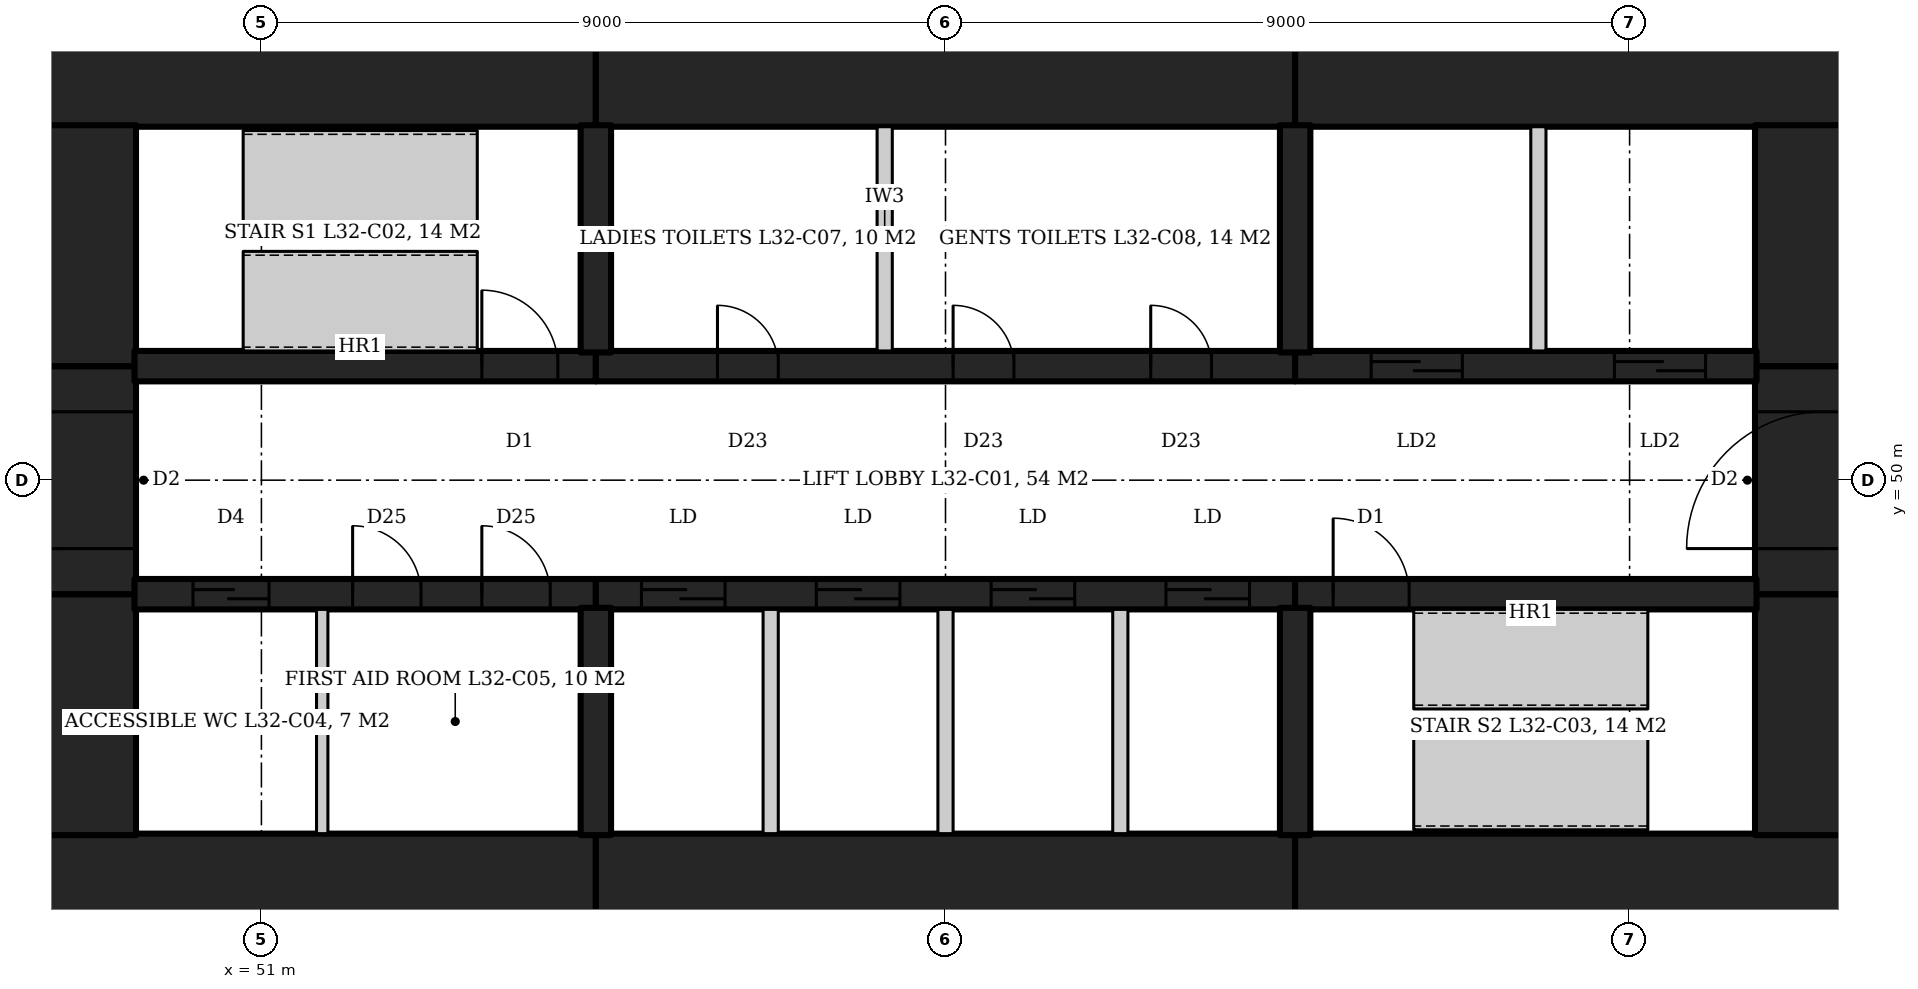
"""IFC4 building model, lengths in metres.
Left out: names, types, materials, properties, quantities, classifications, styles, units other than length and angle.
Written with IfcOpenShell. Run it as: python <this file> out.ifc"""

import sys

from ifc_helpers import new_model, si_unit, direction, frame, frame_2d, origin, place, context, subcontext, project, spatial, rectangle, extrude, element, fill, save


model = new_model("IFC4")
c1 = context("Model", 3, precision=1e-05, world=origin(), true_north=direction((0.0, 1.0)))
c2 = subcontext(c1, "Body", "Model", "MODEL_VIEW")
j1 = project(units=[si_unit("LENGTHUNIT", "METRE"), si_unit("PLANEANGLEUNIT", "RADIAN")], contexts=[c1])
p1 = place(None, origin())
s1 = spatial("IfcSite", under=j1, at=p1, CompositionType="ELEMENT")
p2 = place(p1, origin())
s2 = spatial("IfcBuilding", under=s1, at=p2, CompositionType="ELEMENT")
p3 = place(p2, frame((0.0, 0.0, 135.2)))
s3 = spatial("IfcBuildingStorey", under=s2, at=p3, CompositionType="ELEMENT", Elevation=135.2)
p4 = place(p3, frame((47.55, 55.55, 0.0), z_axis=(0.0, 0.0, 1.0), x_axis=(1.0, 0.0, 0.0)))
e1 = element("IfcWall", 1, at=p4, inside=s3, PredefinedType="SHEAR", context=c2, shape_type="SweptSolid", body=[
    extrude(rectangle(XDim=7.85, YDim=1.8, at=frame_2d((3.925, 0.0))), origin(), (0.0, 0.0, 1.0), 4.2),
])
p5 = place(p3, frame((55.4, 55.55, 0.0), z_axis=(0.0, 0.0, 1.0), x_axis=(1.0, 0.0, 0.0)))
e2 = element("IfcWall", 2, at=p5, inside=s3, PredefinedType="SHEAR", context=c2, shape_type="SweptSolid", body=[
    extrude(rectangle(XDim=9.2, YDim=1.8, at=frame_2d((4.6, 0.0))), origin(), (0.0, 0.0, 1.0), 4.2),
])
for number, where, z_axis, x_axis in (
    (3, (64.6, 55.55, 0.0), (0.0, 0.0, 1.0), (1.0, 0.0, 0.0)),
    (4, (47.55, 44.45, 0.0), (0.0, 0.0, 1.0), (1.0, 0.0, 0.0)),
):
    element("IfcWall", number, at=place(p3, frame(where, z_axis=z_axis, x_axis=x_axis)), inside=s3, PredefinedType="SHEAR", context=c2, shape_type="SweptSolid", body=[
        extrude(rectangle(XDim=7.85, YDim=1.8, at=frame_2d((3.925, 0.0))), origin(), (0.0, 0.0, 1.0), 4.2),
    ])
p6 = place(p3, frame((55.4, 44.45, 0.0), z_axis=(0.0, 0.0, 1.0), x_axis=(1.0, 0.0, 0.0)))
e5 = element("IfcWall", 5, at=p6, inside=s3, PredefinedType="SHEAR", context=c2, shape_type="SweptSolid", body=[
    extrude(rectangle(XDim=9.2, YDim=1.8, at=frame_2d((4.6, 0.0))), origin(), (0.0, 0.0, 1.0), 4.2),
])
p7 = place(p3, frame((64.6, 44.45, 0.0), z_axis=(0.0, 0.0, 1.0), x_axis=(1.0, 0.0, 0.0)))
e6 = element("IfcWall", 6, at=p7, inside=s3, PredefinedType="SHEAR", context=c2, shape_type="SweptSolid", body=[
    extrude(rectangle(XDim=7.85, YDim=1.8, at=frame_2d((3.925, 0.0))), origin(), (0.0, 0.0, 1.0), 4.2),
])
p8 = place(p3, frame((71.55, 45.33, 0.0), z_axis=(0.0, 0.0, 1.0), x_axis=(0.0, 1.0, 0.0)))
e7 = element("IfcWall", 7, at=p8, inside=s3, PredefinedType="SHEAR", context=c2, shape_type="SweptSolid", body=[
    extrude(rectangle(XDim=3.17, YDim=1.8, at=frame_2d((1.585, 0.0))), origin(), (0.0, 0.0, 1.0), 4.2),
])
p9 = place(p3, frame((71.55, 48.5, 0.0), z_axis=(0.0, 0.0, 1.0), x_axis=(0.0, 1.0, 0.0)))
e8 = element("IfcWall", 8, at=p9, inside=s3, PredefinedType="SHEAR", context=c2, shape_type="SweptSolid", body=[
    extrude(rectangle(XDim=3.0, YDim=1.8, at=frame_2d((1.5, 0.0))), origin(), (0.0, 0.0, 1.0), 4.2),
])
p10 = place(p9, frame((0.6, 0.0, 0.0)))
e9 = element("IfcOpeningElement", 9, at=p10, cuts=e8, PredefinedType="OPENING", context=c2, shape_type="SweptSolid", body=[
    extrude(rectangle(XDim=1.8, YDim=2.1, at=frame_2d((0.9, 1.05))), frame((0.0, 0.91, 0.0), z_axis=(0.0, -1.0, 0.0), x_axis=(1.0, 0.0, 0.0)), (0.0, 0.0, 1.0), 1.82),
])
for number, where, z_axis, x_axis in (
    (10, (71.55, 51.5, 0.0), (0.0, 0.0, 1.0), (0.0, 1.0, 0.0)),
    (11, (48.45, 45.33, 0.0), (0.0, 0.0, 1.0), (0.0, 1.0, 0.0)),
):
    element("IfcWall", number, at=place(p3, frame(where, z_axis=z_axis, x_axis=x_axis)), inside=s3, PredefinedType="SHEAR", context=c2, shape_type="SweptSolid", body=[
        extrude(rectangle(XDim=3.17, YDim=1.8, at=frame_2d((1.585, 0.0))), origin(), (0.0, 0.0, 1.0), 4.2),
    ])
p11 = place(p3, frame((48.45, 48.5, 0.0), z_axis=(0.0, 0.0, 1.0), x_axis=(0.0, 1.0, 0.0)))
e12 = element("IfcWall", 12, at=p11, inside=s3, PredefinedType="SHEAR", context=c2, shape_type="SweptSolid", body=[
    extrude(rectangle(XDim=3.0, YDim=1.8, at=frame_2d((1.5, 0.0))), origin(), (0.0, 0.0, 1.0), 4.2),
])
p12 = place(p11, frame((0.6, 0.0, 0.0)))
e13 = element("IfcOpeningElement", 13, at=p12, cuts=e12, PredefinedType="OPENING", context=c2, shape_type="SweptSolid", body=[
    extrude(rectangle(XDim=1.8, YDim=2.1, at=frame_2d((0.9, 1.05))), frame((0.0, 0.91, 0.0), z_axis=(0.0, -1.0, 0.0), x_axis=(1.0, 0.0, 0.0)), (0.0, 0.0, 1.0), 1.82),
])
p13 = place(p3, frame((48.45, 51.5, 0.0), z_axis=(0.0, 0.0, 1.0), x_axis=(0.0, 1.0, 0.0)))
e14 = element("IfcWall", 14, at=p13, inside=s3, PredefinedType="SHEAR", context=c2, shape_type="SweptSolid", body=[
    extrude(rectangle(XDim=3.17, YDim=1.8, at=frame_2d((1.585, 0.0))), origin(), (0.0, 0.0, 1.0), 4.2),
])
p14 = place(p3, frame((49.33, 51.5, 0.0), z_axis=(0.0, 0.0, 1.0), x_axis=(1.0, 0.0, 0.0)))
e15 = element("IfcWall", 15, at=p14, inside=s3, PredefinedType="SHEAR", context=c2, shape_type="SweptSolid", body=[
    extrude(rectangle(XDim=6.07, YDim=0.4, at=frame_2d((3.035, 0.0))), origin(), (0.0, 0.0, 1.0), 4.2),
])
p15 = place(p14, frame((4.57, 0.0, 0.0)))
e16 = element("IfcOpeningElement", 16, at=p15, cuts=e15, PredefinedType="OPENING", context=c2, shape_type="SweptSolid", body=[
    extrude(rectangle(XDim=1.0, YDim=2.1, at=frame_2d((0.5, 1.05))), frame((0.0, 0.21, 0.0), z_axis=(0.0, -1.0, 0.0), x_axis=(1.0, 0.0, 0.0)), (0.0, 0.0, 1.0), 0.42),
])
p16 = place(p3, frame((55.4, 51.5, 0.0), z_axis=(0.0, 0.0, 1.0), x_axis=(1.0, 0.0, 0.0)))
e17 = element("IfcWall", 17, at=p16, inside=s3, PredefinedType="SHEAR", context=c2, shape_type="SweptSolid", body=[
    extrude(rectangle(XDim=9.2, YDim=0.4, at=frame_2d((4.6, 0.0))), origin(), (0.0, 0.0, 1.0), 4.2),
])
p17 = place(p16, frame((1.6, 0.0, 0.0)))
e18 = element("IfcOpeningElement", 18, at=p17, cuts=e17, PredefinedType="OPENING", context=c2, shape_type="SweptSolid", body=[
    extrude(rectangle(XDim=0.8, YDim=2.1, at=frame_2d((0.4, 1.05))), frame((0.0, 0.21, 0.0), z_axis=(0.0, -1.0, 0.0), x_axis=(1.0, 0.0, 0.0)), (0.0, 0.0, 1.0), 0.42),
])
p18 = place(p16, frame((4.7, 0.0, 0.0)))
e19 = element("IfcOpeningElement", 19, at=p18, cuts=e17, PredefinedType="OPENING", context=c2, shape_type="SweptSolid", body=[
    extrude(rectangle(XDim=0.8, YDim=2.1, at=frame_2d((0.4, 1.05))), frame((0.0, 0.21, 0.0), z_axis=(0.0, -1.0, 0.0), x_axis=(1.0, 0.0, 0.0)), (0.0, 0.0, 1.0), 0.42),
])
p19 = place(p16, frame((7.3, 0.0, 0.0)))
e20 = element("IfcOpeningElement", 20, at=p19, cuts=e17, PredefinedType="OPENING", context=c2, shape_type="SweptSolid", body=[
    extrude(rectangle(XDim=0.8, YDim=2.1, at=frame_2d((0.4, 1.05))), frame((0.0, 0.21, 0.0), z_axis=(0.0, -1.0, 0.0), x_axis=(1.0, 0.0, 0.0)), (0.0, 0.0, 1.0), 0.42),
])
p20 = place(p3, frame((64.6, 51.5, 0.0), z_axis=(0.0, 0.0, 1.0), x_axis=(1.0, 0.0, 0.0)))
e21 = element("IfcWall", 21, at=p20, inside=s3, PredefinedType="SHEAR", context=c2, shape_type="SweptSolid", body=[
    extrude(rectangle(XDim=6.07, YDim=0.4, at=frame_2d((3.035, 0.0))), origin(), (0.0, 0.0, 1.0), 4.2),
])
p21 = place(p20, frame((1.0, 0.0, 0.0)))
e22 = element("IfcOpeningElement", 22, at=p21, cuts=e21, PredefinedType="OPENING", context=c2, shape_type="SweptSolid", body=[
    extrude(rectangle(XDim=1.2, YDim=2.1, at=frame_2d((0.6, 1.05))), frame((0.0, 0.21, 0.0), z_axis=(0.0, -1.0, 0.0), x_axis=(1.0, 0.0, 0.0)), (0.0, 0.0, 1.0), 0.42),
])
p22 = place(p20, frame((4.2, 0.0, 0.0)))
e23 = element("IfcOpeningElement", 23, at=p22, cuts=e21, PredefinedType="OPENING", context=c2, shape_type="SweptSolid", body=[
    extrude(rectangle(XDim=1.2, YDim=2.1, at=frame_2d((0.6, 1.05))), frame((0.0, 0.21, 0.0), z_axis=(0.0, -1.0, 0.0), x_axis=(1.0, 0.0, 0.0)), (0.0, 0.0, 1.0), 0.42),
])
p23 = place(p3, frame((49.33, 48.5, 0.0), z_axis=(0.0, 0.0, 1.0), x_axis=(1.0, 0.0, 0.0)))
e24 = element("IfcWall", 24, at=p23, inside=s3, PredefinedType="SHEAR", context=c2, shape_type="SweptSolid", body=[
    extrude(rectangle(XDim=6.07, YDim=0.4, at=frame_2d((3.035, 0.0))), origin(), (0.0, 0.0, 1.0), 4.2),
])
p24 = place(p23, frame((0.77, 0.0, 0.0)))
e25 = element("IfcOpeningElement", 25, at=p24, cuts=e24, PredefinedType="OPENING", context=c2, shape_type="SweptSolid", body=[
    extrude(rectangle(XDim=1.0, YDim=2.1, at=frame_2d((0.5, 1.05))), frame((0.0, 0.21, 0.0), z_axis=(0.0, -1.0, 0.0), x_axis=(1.0, 0.0, 0.0)), (0.0, 0.0, 1.0), 0.42),
])
p25 = place(p23, frame((2.87, 0.0, 0.0)))
e26 = element("IfcOpeningElement", 26, at=p25, cuts=e24, PredefinedType="OPENING", context=c2, shape_type="SweptSolid", body=[
    extrude(rectangle(XDim=0.9, YDim=2.1, at=frame_2d((0.45, 1.05))), frame((0.0, 0.21, 0.0), z_axis=(0.0, -1.0, 0.0), x_axis=(1.0, 0.0, 0.0)), (0.0, 0.0, 1.0), 0.42),
])
p26 = place(p23, frame((4.57, 0.0, 0.0)))
e27 = element("IfcOpeningElement", 27, at=p26, cuts=e24, PredefinedType="OPENING", context=c2, shape_type="SweptSolid", body=[
    extrude(rectangle(XDim=0.9, YDim=2.1, at=frame_2d((0.45, 1.05))), frame((0.0, 0.21, 0.0), z_axis=(0.0, -1.0, 0.0), x_axis=(1.0, 0.0, 0.0)), (0.0, 0.0, 1.0), 0.42),
])
p27 = place(p3, frame((55.4, 48.5, 0.0), z_axis=(0.0, 0.0, 1.0), x_axis=(1.0, 0.0, 0.0)))
e28 = element("IfcWall", 28, at=p27, inside=s3, PredefinedType="SHEAR", context=c2, shape_type="SweptSolid", body=[
    extrude(rectangle(XDim=9.2, YDim=0.4, at=frame_2d((4.6, 0.0))), origin(), (0.0, 0.0, 1.0), 4.2),
])
p28 = place(p27, frame((0.6, 0.0, 0.0)))
e29 = element("IfcOpeningElement", 29, at=p28, cuts=e28, PredefinedType="OPENING", context=c2, shape_type="SweptSolid", body=[
    extrude(rectangle(XDim=1.1, YDim=2.1, at=frame_2d((0.55, 1.05))), frame((0.0, 0.21, 0.0), z_axis=(0.0, -1.0, 0.0), x_axis=(1.0, 0.0, 0.0)), (0.0, 0.0, 1.0), 0.42),
])
p29 = place(p27, frame((2.9, 0.0, 0.0)))
e30 = element("IfcOpeningElement", 30, at=p29, cuts=e28, PredefinedType="OPENING", context=c2, shape_type="SweptSolid", body=[
    extrude(rectangle(XDim=1.1, YDim=2.1, at=frame_2d((0.55, 1.05))), frame((0.0, 0.21, 0.0), z_axis=(0.0, -1.0, 0.0), x_axis=(1.0, 0.0, 0.0)), (0.0, 0.0, 1.0), 0.42),
])
p30 = place(p27, frame((5.2, 0.0, 0.0)))
e31 = element("IfcOpeningElement", 31, at=p30, cuts=e28, PredefinedType="OPENING", context=c2, shape_type="SweptSolid", body=[
    extrude(rectangle(XDim=1.1, YDim=2.1, at=frame_2d((0.55, 1.05))), frame((0.0, 0.21, 0.0), z_axis=(0.0, -1.0, 0.0), x_axis=(1.0, 0.0, 0.0)), (0.0, 0.0, 1.0), 0.42),
])
p31 = place(p27, frame((7.5, 0.0, 0.0)))
e32 = element("IfcOpeningElement", 32, at=p31, cuts=e28, PredefinedType="OPENING", context=c2, shape_type="SweptSolid", body=[
    extrude(rectangle(XDim=1.1, YDim=2.1, at=frame_2d((0.55, 1.05))), frame((0.0, 0.21, 0.0), z_axis=(0.0, -1.0, 0.0), x_axis=(1.0, 0.0, 0.0)), (0.0, 0.0, 1.0), 0.42),
])
p32 = place(p3, frame((64.6, 48.5, 0.0), z_axis=(0.0, 0.0, 1.0), x_axis=(1.0, 0.0, 0.0)))
e33 = element("IfcWall", 33, at=p32, inside=s3, PredefinedType="SHEAR", context=c2, shape_type="SweptSolid", body=[
    extrude(rectangle(XDim=6.07, YDim=0.4, at=frame_2d((3.035, 0.0))), origin(), (0.0, 0.0, 1.0), 4.2),
])
p33 = place(p32, frame((0.5, 0.0, 0.0)))
e34 = element("IfcOpeningElement", 34, at=p33, cuts=e33, PredefinedType="OPENING", context=c2, shape_type="SweptSolid", body=[
    extrude(rectangle(XDim=1.0, YDim=2.1, at=frame_2d((0.5, 1.05))), frame((0.0, 0.21, 0.0), z_axis=(0.0, -1.0, 0.0), x_axis=(1.0, 0.0, 0.0)), (0.0, 0.0, 1.0), 0.42),
])
for number, where, z_axis, x_axis in (
    (35, (55.4, 51.68, 0.0), (0.0, 0.0, 1.0), (0.0, 1.0, 0.0)),
    (36, (64.6, 51.68, 0.0), (0.0, 0.0, 1.0), (0.0, 1.0, 0.0)),
    (37, (55.4, 48.32, 0.0), (0.0, 0.0, 1.0), (0.0, -1.0, 0.0)),
    (38, (64.6, 48.32, 0.0), (0.0, 0.0, 1.0), (0.0, -1.0, 0.0)),
):
    element("IfcWall", number, at=place(p3, frame(where, z_axis=z_axis, x_axis=x_axis)), inside=s3, PredefinedType="SHEAR", context=c2, shape_type="SweptSolid", body=[
        extrude(rectangle(XDim=2.99, YDim=0.4, at=frame_2d((1.495, 0.0))), origin(), (0.0, 0.0, 1.0), 4.2),
    ])
for number, where, z_axis, x_axis in (
    (39, (57.7, 45.35, 0.0), (0.0, 0.0, 1.0), (0.0, 1.0, 0.0)),
    (40, (60.0, 45.35, 0.0), (0.0, 0.0, 1.0), (0.0, 1.0, 0.0)),
    (41, (62.3, 45.35, 0.0), (0.0, 0.0, 1.0), (0.0, 1.0, 0.0)),
    (42, (67.8, 51.7, 0.0), (0.0, 0.0, 1.0), (0.0, 1.0, 0.0)),
):
    element("IfcWall", number, at=place(p3, frame(where, z_axis=z_axis, x_axis=x_axis)), inside=s3, PredefinedType="PARTITIONING", context=c2, shape_type="SweptSolid", body=[
        extrude(rectangle(XDim=2.95, YDim=0.2, at=frame_2d((1.475, 0.0))), origin(), (0.0, 0.0, 1.0), 4.2),
    ])
p34 = place(p3, frame((51.8, 45.35, 0.0), z_axis=(0.0, 0.0, 1.0), x_axis=(0.0, 1.0, 0.0)))
e43 = element("IfcWall", 43, at=p34, inside=s3, PredefinedType="PARTITIONING", context=c2, shape_type="SweptSolid", body=[
    extrude(rectangle(XDim=2.95, YDim=0.15, at=frame_2d((1.475, 0.0))), origin(), (0.0, 0.0, 1.0), 4.04),
])
p35 = place(p3, frame((59.2, 51.7, 0.0), z_axis=(0.0, 0.0, 1.0), x_axis=(0.0, 1.0, 0.0)))
e44 = element("IfcWall", 44, at=p35, inside=s3, PredefinedType="PARTITIONING", context=c2, shape_type="SweptSolid", body=[
    extrude(rectangle(XDim=2.95, YDim=0.2, at=frame_2d((1.475, 0.0))), origin(), (0.0, 0.0, 1.0), 4.04),
])
p36 = place(p15, origin())
e45 = element("IfcDoor", 45, at=p36, inside=s3, OperationType="SINGLE_SWING_LEFT", PredefinedType="DOOR", context=c2, shape_type="SweptSolid", body=[
    extrude(rectangle(XDim=1.0, YDim=2.1, at=frame_2d((0.5, 1.05))), frame((0.0, 0.025, 0.0), z_axis=(0.0, -1.0, 0.0), x_axis=(1.0, 0.0, 0.0)), (0.0, 0.0, 1.0), 0.05),
])
fill(e16, e45)
p37 = place(p33, origin())
e46 = element("IfcDoor", 46, at=p37, inside=s3, OperationType="SINGLE_SWING_LEFT", PredefinedType="DOOR", context=c2, shape_type="SweptSolid", body=[
    extrude(rectangle(XDim=1.0, YDim=2.1, at=frame_2d((0.5, 1.05))), frame((0.0, 0.025, 0.0), z_axis=(0.0, -1.0, 0.0), x_axis=(1.0, 0.0, 0.0)), (0.0, 0.0, 1.0), 0.05),
])
fill(e34, e46)
p38 = place(p21, origin())
e47 = element("IfcDoor", 47, at=p38, inside=s3, OperationType="SLIDING_TO_LEFT", PredefinedType="DOOR", context=c2, shape_type="SweptSolid", body=[
    extrude(rectangle(XDim=1.2, YDim=2.1, at=frame_2d((0.6, 1.05))), frame((0.0, 0.025, 0.0), z_axis=(0.0, -1.0, 0.0), x_axis=(1.0, 0.0, 0.0)), (0.0, 0.0, 1.0), 0.05),
])
fill(e22, e47)
p39 = place(p22, origin())
e48 = element("IfcDoor", 48, at=p39, inside=s3, OperationType="SLIDING_TO_LEFT", PredefinedType="DOOR", context=c2, shape_type="SweptSolid", body=[
    extrude(rectangle(XDim=1.2, YDim=2.1, at=frame_2d((0.6, 1.05))), frame((0.0, 0.025, 0.0), z_axis=(0.0, -1.0, 0.0), x_axis=(1.0, 0.0, 0.0)), (0.0, 0.0, 1.0), 0.05),
])
fill(e23, e48)
p40 = place(p28, origin())
e49 = element("IfcDoor", 49, at=p40, inside=s3, OperationType="SLIDING_TO_LEFT", PredefinedType="DOOR", context=c2, shape_type="SweptSolid", body=[
    extrude(rectangle(XDim=1.1, YDim=2.1, at=frame_2d((0.55, 1.05))), frame((0.0, 0.025, 0.0), z_axis=(0.0, -1.0, 0.0), x_axis=(1.0, 0.0, 0.0)), (0.0, 0.0, 1.0), 0.05),
])
fill(e29, e49)
p41 = place(p29, origin())
e50 = element("IfcDoor", 50, at=p41, inside=s3, OperationType="SLIDING_TO_LEFT", PredefinedType="DOOR", context=c2, shape_type="SweptSolid", body=[
    extrude(rectangle(XDim=1.1, YDim=2.1, at=frame_2d((0.55, 1.05))), frame((0.0, 0.025, 0.0), z_axis=(0.0, -1.0, 0.0), x_axis=(1.0, 0.0, 0.0)), (0.0, 0.0, 1.0), 0.05),
])
fill(e30, e50)
p42 = place(p30, origin())
e51 = element("IfcDoor", 51, at=p42, inside=s3, OperationType="SLIDING_TO_LEFT", PredefinedType="DOOR", context=c2, shape_type="SweptSolid", body=[
    extrude(rectangle(XDim=1.1, YDim=2.1, at=frame_2d((0.55, 1.05))), frame((0.0, 0.025, 0.0), z_axis=(0.0, -1.0, 0.0), x_axis=(1.0, 0.0, 0.0)), (0.0, 0.0, 1.0), 0.05),
])
fill(e31, e51)
p43 = place(p31, origin())
e52 = element("IfcDoor", 52, at=p43, inside=s3, OperationType="SLIDING_TO_LEFT", PredefinedType="DOOR", context=c2, shape_type="SweptSolid", body=[
    extrude(rectangle(XDim=1.1, YDim=2.1, at=frame_2d((0.55, 1.05))), frame((0.0, 0.025, 0.0), z_axis=(0.0, -1.0, 0.0), x_axis=(1.0, 0.0, 0.0)), (0.0, 0.0, 1.0), 0.05),
])
fill(e32, e52)
p44 = place(p24, origin())
e53 = element("IfcDoor", 53, at=p44, inside=s3, OperationType="SLIDING_TO_LEFT", PredefinedType="DOOR", context=c2, shape_type="SweptSolid", body=[
    extrude(rectangle(XDim=1.0, YDim=2.1, at=frame_2d((0.5, 1.05))), frame((0.0, 0.025, 0.0), z_axis=(0.0, -1.0, 0.0), x_axis=(1.0, 0.0, 0.0)), (0.0, 0.0, 1.0), 0.05),
])
fill(e25, e53)
p45 = place(p25, origin())
e54 = element("IfcDoor", 54, at=p45, inside=s3, OperationType="SINGLE_SWING_RIGHT", PredefinedType="DOOR", context=c2, shape_type="SweptSolid", body=[
    extrude(rectangle(XDim=0.9, YDim=2.1, at=frame_2d((0.45, 1.05))), frame((0.0, 0.025, 0.0), z_axis=(0.0, -1.0, 0.0), x_axis=(1.0, 0.0, 0.0)), (0.0, 0.0, 1.0), 0.05),
])
fill(e26, e54)
p46 = place(p26, origin())
e55 = element("IfcDoor", 55, at=p46, inside=s3, OperationType="SINGLE_SWING_RIGHT", PredefinedType="DOOR", context=c2, shape_type="SweptSolid", body=[
    extrude(rectangle(XDim=0.9, YDim=2.1, at=frame_2d((0.45, 1.05))), frame((0.0, 0.025, 0.0), z_axis=(0.0, -1.0, 0.0), x_axis=(1.0, 0.0, 0.0)), (0.0, 0.0, 1.0), 0.05),
])
fill(e27, e55)
p47 = place(p10, origin())
e56 = element("IfcDoor", 56, at=p47, inside=s3, OperationType="DOUBLE_DOOR_DOUBLE_SWING", PredefinedType="DOOR", context=c2, shape_type="SweptSolid", body=[
    extrude(rectangle(XDim=1.8, YDim=2.1, at=frame_2d((0.9, 1.05))), frame((0.0, 0.025, 0.0), z_axis=(0.0, -1.0, 0.0), x_axis=(1.0, 0.0, 0.0)), (0.0, 0.0, 1.0), 0.05),
])
fill(e9, e56)
p48 = place(p12, origin())
e57 = element("IfcDoor", 57, at=p48, inside=s3, OperationType="DOUBLE_DOOR_DOUBLE_SWING", PredefinedType="DOOR", context=c2, shape_type="SweptSolid", body=[
    extrude(rectangle(XDim=1.8, YDim=2.1, at=frame_2d((0.9, 1.05))), frame((0.0, 0.025, 0.0), z_axis=(0.0, -1.0, 0.0), x_axis=(1.0, 0.0, 0.0)), (0.0, 0.0, 1.0), 0.05),
])
fill(e13, e57)
p49 = place(p17, origin())
e58 = element("IfcDoor", 58, at=p49, inside=s3, OperationType="SINGLE_SWING_LEFT", PredefinedType="DOOR", context=c2, shape_type="SweptSolid", body=[
    extrude(rectangle(XDim=0.8, YDim=2.1, at=frame_2d((0.4, 1.05))), frame((0.0, 0.025, 0.0), z_axis=(0.0, -1.0, 0.0), x_axis=(1.0, 0.0, 0.0)), (0.0, 0.0, 1.0), 0.05),
])
fill(e18, e58)
p50 = place(p18, origin())
e59 = element("IfcDoor", 59, at=p50, inside=s3, OperationType="SINGLE_SWING_LEFT", PredefinedType="DOOR", context=c2, shape_type="SweptSolid", body=[
    extrude(rectangle(XDim=0.8, YDim=2.1, at=frame_2d((0.4, 1.05))), frame((0.0, 0.025, 0.0), z_axis=(0.0, -1.0, 0.0), x_axis=(1.0, 0.0, 0.0)), (0.0, 0.0, 1.0), 0.05),
])
fill(e19, e59)
p51 = place(p19, origin())
e60 = element("IfcDoor", 60, at=p51, inside=s3, OperationType="SINGLE_SWING_LEFT", PredefinedType="DOOR", context=c2, shape_type="SweptSolid", body=[
    extrude(rectangle(XDim=0.8, YDim=2.1, at=frame_2d((0.4, 1.05))), frame((0.0, 0.025, 0.0), z_axis=(0.0, -1.0, 0.0), x_axis=(1.0, 0.0, 0.0)), (0.0, 0.0, 1.0), 0.05),
])
fill(e20, e60)
save(model, sys.argv[1])
